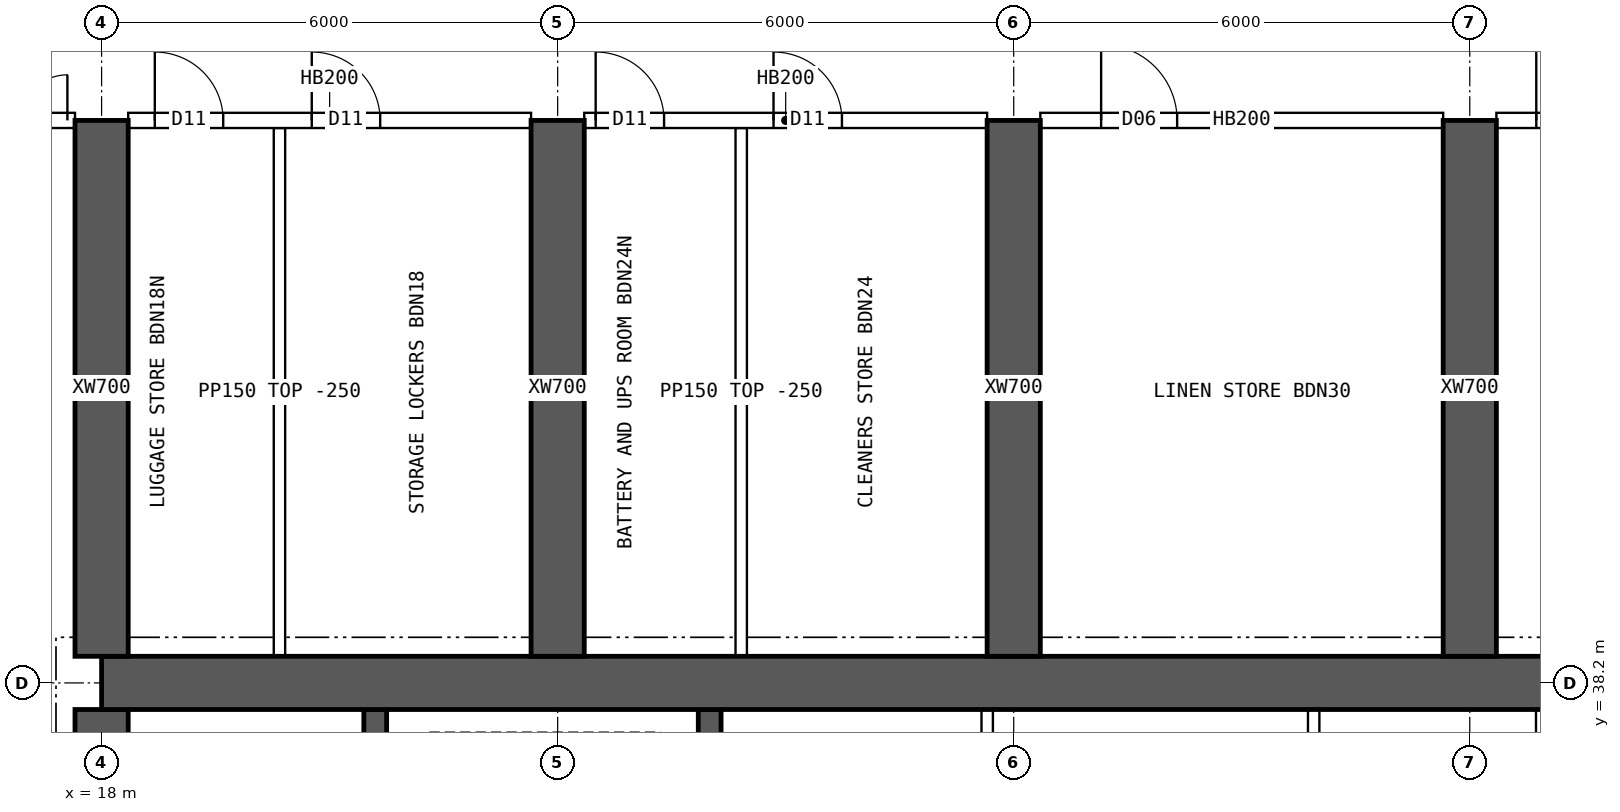
"""IFC4 building model, lengths in metres.
Left out: names, types, materials, properties, quantities, classifications, styles, units other than length and angle.
Written with IfcOpenShell. Run it as: python <this file> out.ifc"""

import sys

from ifc_helpers import new_model, si_unit, direction, frame, frame_2d, origin, place, context, subcontext, project, spatial, rectangle, extrude, element, fill, save


model = new_model("IFC4")
c1 = context("Model", 3, precision=1e-05, world=origin(), true_north=direction((0.0, 1.0)))
c2 = subcontext(c1, "Body", "Model", "MODEL_VIEW")
j1 = project(units=[si_unit("LENGTHUNIT", "METRE"), si_unit("PLANEANGLEUNIT", "RADIAN")], contexts=[c1])
p1 = place(None, origin())
s1 = spatial("IfcSite", under=j1, at=p1, CompositionType="ELEMENT")
p2 = place(p1, origin())
s2 = spatial("IfcBuilding", under=s1, at=p2, CompositionType="ELEMENT")
p3 = place(p2, frame((0.0, 0.0, 250.3)))
s3 = spatial("IfcBuildingStorey", under=s2, at=p3, CompositionType="ELEMENT", Elevation=250.3)
p4 = place(p3, frame((18.0, 38.2, 0.0), z_axis=(0.0, 0.0, 1.0), x_axis=(1.0, 0.0, 0.0)))
e1 = element("IfcWall", 1, at=p4, inside=s3, PredefinedType="SHEAR", context=c2, shape_type="SweptSolid", body=[
    extrude(rectangle(XDim=48.0, YDim=0.7, at=frame_2d((24.0, 0.0))), origin(), (0.0, 0.0, 1.0), 3.75),
])
p5 = place(p3, frame((18.0, 26.15, 0.0), z_axis=(0.0, 0.0, 1.0), x_axis=(0.0, 1.0, 0.0)))
e2 = element("IfcWall", 2, at=p5, inside=s3, PredefinedType="SHEAR", context=c2, shape_type="SweptSolid", body=[
    extrude(rectangle(XDim=11.7, YDim=0.7, at=frame_2d((5.85, 0.0))), origin(), (0.0, 0.0, 1.0), 3.75),
])
p6 = place(p5, frame((5.15, 0.0, 0.0)))
e3 = element("IfcOpeningElement", 3, at=p6, cuts=e2, PredefinedType="OPENING", context=c2, shape_type="SweptSolid", body=[
    extrude(rectangle(XDim=1.2, YDim=2.1, at=frame_2d((0.6, 1.05))), frame((0.0, 0.36, 0.0), z_axis=(0.0, -1.0, 0.0), x_axis=(1.0, 0.0, 0.0)), (0.0, 0.0, 1.0), 0.72),
])
for number, where, z_axis, x_axis in (
    (4, (21.6, 34.75, 0.0), (0.0, 0.0, 1.0), (0.0, 1.0, 0.0)),
    (5, (26.0, 34.75, 0.0), (0.0, 0.0, 1.0), (0.0, 1.0, 0.0)),
):
    element("IfcWall", number, at=place(p3, frame(where, z_axis=z_axis, x_axis=x_axis)), inside=s3, PredefinedType="SHEAR", context=c2, shape_type="SweptSolid", body=[
        extrude(rectangle(XDim=3.1, YDim=0.3, at=frame_2d((1.55, 0.0))), origin(), (0.0, 0.0, 1.0), 3.75),
    ])
for number, where, z_axis, x_axis in (
    (6, (18.0, 38.55, 0.0), (0.0, 0.0, 1.0), (0.0, 1.0, 0.0)),
    (7, (24.0, 38.55, 0.0), (0.0, 0.0, 1.0), (0.0, 1.0, 0.0)),
    (8, (30.0, 38.55, 0.0), (0.0, 0.0, 1.0), (0.0, 1.0, 0.0)),
    (9, (36.0, 38.55, 0.0), (0.0, 0.0, 1.0), (0.0, 1.0, 0.0)),
):
    element("IfcWall", number, at=place(p3, frame(where, z_axis=z_axis, x_axis=x_axis)), inside=s3, PredefinedType="SHEAR", context=c2, shape_type="SweptSolid", body=[
        extrude(rectangle(XDim=7.05, YDim=0.7, at=frame_2d((3.525, 0.0))), origin(), (0.0, 0.0, 1.0), 3.75),
    ])
for number, where, z_axis, x_axis in (
    (10, (29.651, 34.75, 0.0), (0.0, 0.0, 1.0), (0.0, 1.0, 0.0)),
    (11, (33.946, 34.75, 0.0), (0.0, 0.0, 1.0), (0.0, 1.0, 0.0)),
    (12, (36.946, 34.75, 0.0), (0.0, 0.0, 1.0), (0.0, 1.0, 0.0)),
):
    element("IfcWall", number, at=place(p3, frame(where, z_axis=z_axis, x_axis=x_axis)), inside=s3, PredefinedType="SOLIDWALL", context=c2, shape_type="SweptSolid", body=[
        extrude(rectangle(XDim=3.1, YDim=0.15, at=frame_2d((1.55, 0.0))), origin(), (0.0, 0.0, 1.0), 3.5),
    ])
p7 = place(p3, frame((15.6, 45.6, 0.0), z_axis=(0.0, 0.0, 1.0), x_axis=(1.0, 0.0, 0.0)))
e13 = element("IfcWall", 13, at=p7, inside=s3, PredefinedType="SOLIDWALL", context=c2, shape_type="SweptSolid", body=[
    extrude(rectangle(XDim=2.05, YDim=0.2, at=frame_2d((1.025, 0.0))), origin(), (0.0, 0.0, 1.0), 3.5),
])
p8 = place(p7, frame((0.75, 0.0, 0.0)))
e14 = element("IfcOpeningElement", 14, at=p8, cuts=e13, PredefinedType="OPENING", context=c2, shape_type="SweptSolid", body=[
    extrude(rectangle(XDim=1.2, YDim=2.1, at=frame_2d((0.6, 1.05))), frame((0.0, 0.11, 0.0), z_axis=(0.0, -1.0, 0.0), x_axis=(1.0, 0.0, 0.0)), (0.0, 0.0, 1.0), 0.22),
])
p9 = place(p3, frame((18.35, 45.6, 0.0), z_axis=(0.0, 0.0, 1.0), x_axis=(1.0, 0.0, 0.0)))
e15 = element("IfcWall", 15, at=p9, inside=s3, PredefinedType="SOLIDWALL", context=c2, shape_type="SweptSolid", body=[
    extrude(rectangle(XDim=5.3, YDim=0.2, at=frame_2d((2.65, 0.0))), origin(), (0.0, 0.0, 1.0), 3.5),
])
p10 = place(p9, frame((0.35, 0.0, 0.0)))
e16 = element("IfcOpeningElement", 16, at=p10, cuts=e15, PredefinedType="OPENING", context=c2, shape_type="SweptSolid", body=[
    extrude(rectangle(XDim=0.9, YDim=2.1, at=frame_2d((0.45, 1.05))), frame((0.0, 0.11, 0.0), z_axis=(0.0, -1.0, 0.0), x_axis=(1.0, 0.0, 0.0)), (0.0, 0.0, 1.0), 0.22),
])
p11 = place(p9, frame((2.415, 0.0, 0.0)))
e17 = element("IfcOpeningElement", 17, at=p11, cuts=e15, PredefinedType="OPENING", context=c2, shape_type="SweptSolid", body=[
    extrude(rectangle(XDim=0.9, YDim=2.1, at=frame_2d((0.45, 1.05))), frame((0.0, 0.11, 0.0), z_axis=(0.0, -1.0, 0.0), x_axis=(1.0, 0.0, 0.0)), (0.0, 0.0, 1.0), 0.22),
])
p12 = place(p3, frame((24.35, 45.6, 0.0), z_axis=(0.0, 0.0, 1.0), x_axis=(1.0, 0.0, 0.0)))
e18 = element("IfcWall", 18, at=p12, inside=s3, PredefinedType="SOLIDWALL", context=c2, shape_type="SweptSolid", body=[
    extrude(rectangle(XDim=5.3, YDim=0.2, at=frame_2d((2.65, 0.0))), origin(), (0.0, 0.0, 1.0), 3.5),
])
p13 = place(p12, frame((0.15, 0.0, 0.0)))
e19 = element("IfcOpeningElement", 19, at=p13, cuts=e18, PredefinedType="OPENING", context=c2, shape_type="SweptSolid", body=[
    extrude(rectangle(XDim=0.9, YDim=2.1, at=frame_2d((0.45, 1.05))), frame((0.0, 0.11, 0.0), z_axis=(0.0, -1.0, 0.0), x_axis=(1.0, 0.0, 0.0)), (0.0, 0.0, 1.0), 0.22),
])
p14 = place(p12, frame((2.49, 0.0, 0.0)))
e20 = element("IfcOpeningElement", 20, at=p14, cuts=e18, PredefinedType="OPENING", context=c2, shape_type="SweptSolid", body=[
    extrude(rectangle(XDim=0.9, YDim=2.1, at=frame_2d((0.45, 1.05))), frame((0.0, 0.11, 0.0), z_axis=(0.0, -1.0, 0.0), x_axis=(1.0, 0.0, 0.0)), (0.0, 0.0, 1.0), 0.22),
])
p15 = place(p3, frame((30.35, 45.6, 0.0), z_axis=(0.0, 0.0, 1.0), x_axis=(1.0, 0.0, 0.0)))
e21 = element("IfcWall", 21, at=p15, inside=s3, PredefinedType="SOLIDWALL", context=c2, shape_type="SweptSolid", body=[
    extrude(rectangle(XDim=5.3, YDim=0.2, at=frame_2d((2.65, 0.0))), origin(), (0.0, 0.0, 1.0), 3.5),
])
p16 = place(p15, frame((0.8, 0.0, 0.0)))
e22 = element("IfcOpeningElement", 22, at=p16, cuts=e21, PredefinedType="OPENING", context=c2, shape_type="SweptSolid", body=[
    extrude(rectangle(XDim=1.0, YDim=2.1, at=frame_2d((0.5, 1.05))), frame((0.0, 0.11, 0.0), z_axis=(0.0, -1.0, 0.0), x_axis=(1.0, 0.0, 0.0)), (0.0, 0.0, 1.0), 0.22),
])
p17 = place(p3, frame((36.35, 45.6, 0.0), z_axis=(0.0, 0.0, 1.0), x_axis=(1.0, 0.0, 0.0)))
e23 = element("IfcWall", 23, at=p17, inside=s3, PredefinedType="SOLIDWALL", context=c2, shape_type="SweptSolid", body=[
    extrude(rectangle(XDim=5.3, YDim=0.2, at=frame_2d((2.65, 0.0))), origin(), (0.0, 0.0, 1.0), 3.5),
])
p18 = place(p17, frame((0.525, 0.0, 0.0)))
e24 = element("IfcOpeningElement", 24, at=p18, cuts=e23, PredefinedType="OPENING", context=c2, shape_type="SweptSolid", body=[
    extrude(rectangle(XDim=1.0, YDim=2.1, at=frame_2d((0.5, 1.05))), frame((0.0, 0.11, 0.0), z_axis=(0.0, -1.0, 0.0), x_axis=(1.0, 0.0, 0.0)), (0.0, 0.0, 1.0), 0.22),
])
for number, where, z_axis, x_axis in (
    (25, (20.34, 38.55, 0.0), (0.0, 0.0, 1.0), (0.0, 1.0, 0.0)),
    (26, (26.415, 38.55, 0.0), (0.0, 0.0, 1.0), (0.0, 1.0, 0.0)),
):
    element("IfcWall", number, at=place(p3, frame(where, z_axis=z_axis, x_axis=x_axis)), inside=s3, PredefinedType="PARTITIONING", context=c2, shape_type="SweptSolid", body=[
        extrude(rectangle(XDim=6.95, YDim=0.15, at=frame_2d((3.475, 0.0))), origin(), (0.0, 0.0, 1.0), 3.5),
    ])
p19 = place(p8, origin())
e27 = element("IfcDoor", 27, at=p19, inside=s3, OperationType="DOUBLE_DOOR_SINGLE_SWING", PredefinedType="DOOR", context=c2, shape_type="SweptSolid", body=[
    extrude(rectangle(XDim=1.2, YDim=2.1, at=frame_2d((0.6, 1.05))), frame((0.0, 0.025, 0.0), z_axis=(0.0, -1.0, 0.0), x_axis=(1.0, 0.0, 0.0)), (0.0, 0.0, 1.0), 0.05),
])
fill(e14, e27)
p20 = place(p10, origin())
e28 = element("IfcDoor", 28, at=p20, inside=s3, OperationType="SINGLE_SWING_LEFT", PredefinedType="DOOR", context=c2, shape_type="SweptSolid", body=[
    extrude(rectangle(XDim=0.9, YDim=2.1, at=frame_2d((0.45, 1.05))), frame((0.0, 0.025, 0.0), z_axis=(0.0, -1.0, 0.0), x_axis=(1.0, 0.0, 0.0)), (0.0, 0.0, 1.0), 0.05),
])
fill(e16, e28)
p21 = place(p11, origin())
e29 = element("IfcDoor", 29, at=p21, inside=s3, OperationType="SINGLE_SWING_LEFT", PredefinedType="DOOR", context=c2, shape_type="SweptSolid", body=[
    extrude(rectangle(XDim=0.9, YDim=2.1, at=frame_2d((0.45, 1.05))), frame((0.0, 0.025, 0.0), z_axis=(0.0, -1.0, 0.0), x_axis=(1.0, 0.0, 0.0)), (0.0, 0.0, 1.0), 0.05),
])
fill(e17, e29)
p22 = place(p13, origin())
e30 = element("IfcDoor", 30, at=p22, inside=s3, OperationType="SINGLE_SWING_LEFT", PredefinedType="DOOR", context=c2, shape_type="SweptSolid", body=[
    extrude(rectangle(XDim=0.9, YDim=2.1, at=frame_2d((0.45, 1.05))), frame((0.0, 0.025, 0.0), z_axis=(0.0, -1.0, 0.0), x_axis=(1.0, 0.0, 0.0)), (0.0, 0.0, 1.0), 0.05),
])
fill(e19, e30)
p23 = place(p14, origin())
e31 = element("IfcDoor", 31, at=p23, inside=s3, OperationType="SINGLE_SWING_LEFT", PredefinedType="DOOR", context=c2, shape_type="SweptSolid", body=[
    extrude(rectangle(XDim=0.9, YDim=2.1, at=frame_2d((0.45, 1.05))), frame((0.0, 0.025, 0.0), z_axis=(0.0, -1.0, 0.0), x_axis=(1.0, 0.0, 0.0)), (0.0, 0.0, 1.0), 0.05),
])
fill(e20, e31)
p24 = place(p16, origin())
e32 = element("IfcDoor", 32, at=p24, inside=s3, OperationType="SINGLE_SWING_LEFT", PredefinedType="DOOR", context=c2, shape_type="SweptSolid", body=[
    extrude(rectangle(XDim=1.0, YDim=2.1, at=frame_2d((0.5, 1.05))), frame((0.0, 0.025, 0.0), z_axis=(0.0, -1.0, 0.0), x_axis=(1.0, 0.0, 0.0)), (0.0, 0.0, 1.0), 0.05),
])
fill(e22, e32)
p25 = place(p18, origin())
e33 = element("IfcDoor", 33, at=p25, inside=s3, OperationType="SINGLE_SWING_LEFT", PredefinedType="DOOR", context=c2, shape_type="SweptSolid", body=[
    extrude(rectangle(XDim=1.0, YDim=2.1, at=frame_2d((0.5, 1.05))), frame((0.0, 0.025, 0.0), z_axis=(0.0, -1.0, 0.0), x_axis=(1.0, 0.0, 0.0)), (0.0, 0.0, 1.0), 0.05),
])
fill(e24, e33)
save(model, sys.argv[1])
